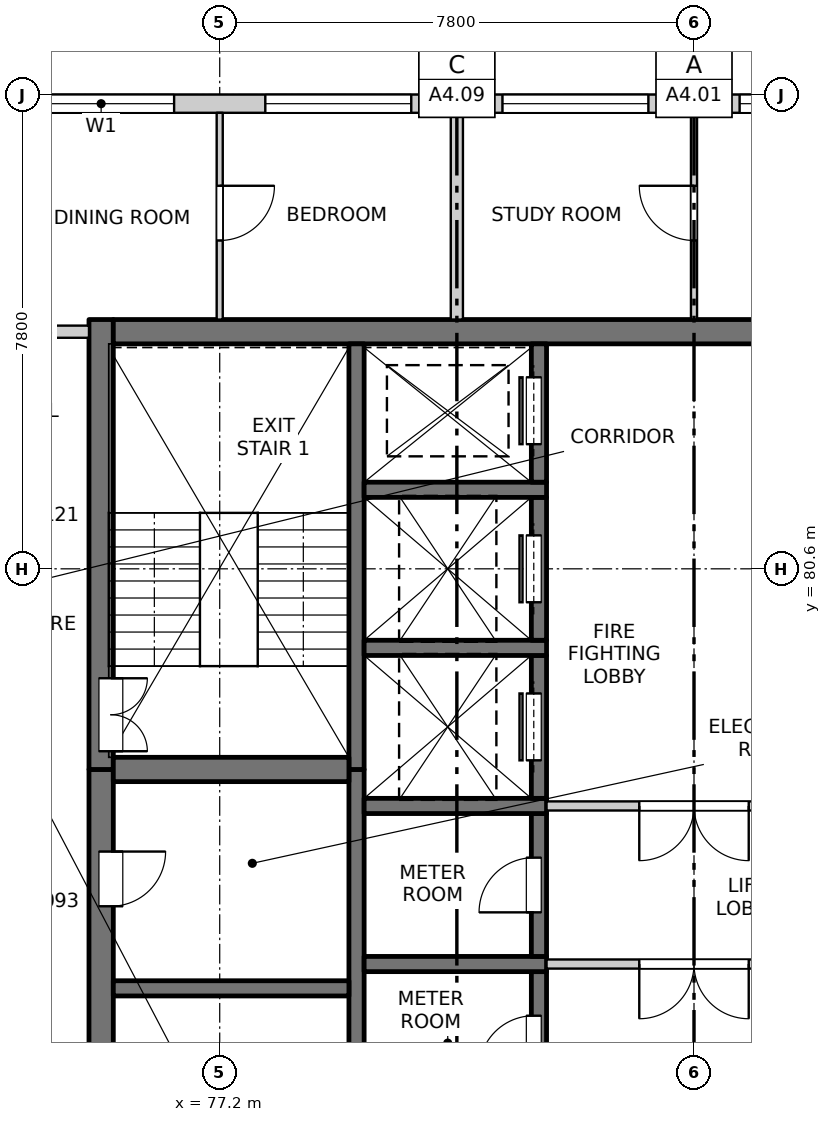
"""IFC4 building model, lengths in metres.
Left out: names, types, materials, properties, quantities, classifications, styles, units other than length and angle.
Written with IfcOpenShell. Run it as: python <this file> out.ifc"""

import sys

from ifc_helpers import new_model, si_unit, direction, frame, frame_2d, origin, place, context, subcontext, project, spatial, rectangle, extrude, element, fill, save


model = new_model("IFC4")
c1 = context("Model", 3, precision=1e-05, world=origin(), true_north=direction((0.0, 1.0)))
c2 = subcontext(c1, "Body", "Model", "MODEL_VIEW")
j1 = project(units=[si_unit("LENGTHUNIT", "METRE"), si_unit("PLANEANGLEUNIT", "RADIAN")], contexts=[c1])
p1 = place(None, origin())
s1 = spatial("IfcSite", under=j1, at=p1, CompositionType="ELEMENT")
p2 = place(p1, origin())
s2 = spatial("IfcBuilding", under=s1, at=p2, CompositionType="ELEMENT")
p3 = place(p2, frame((0.0, 0.0, 210.9)))
s3 = spatial("IfcBuildingStorey", under=s2, at=p3, CompositionType="ELEMENT", Elevation=210.9)
p4 = place(p3, frame((75.25, 55.05, -0.25), z_axis=(0.0, 0.0, 1.0), x_axis=(0.0, 1.0, 0.0)))
e1 = element("IfcWall", 1, at=p4, inside=s3, PredefinedType="SOLIDWALL", context=c2, shape_type="SweptSolid", body=[
    extrude(rectangle(XDim=22.25, YDim=0.4, at=frame_2d((11.125, 0.0))), origin(), (0.0, 0.0, 1.0), 3.4),
])
p5 = place(p4, frame((7.4, 0.0, 0.25)))
e2 = element("IfcOpeningElement", 2, at=p5, cuts=e1, PredefinedType="OPENING", context=c2, shape_type="SweptSolid", body=[
    extrude(rectangle(XDim=0.9, YDim=2.1, at=frame_2d((0.45, 1.05))), frame((0.0, 0.21, 0.0), z_axis=(0.0, -1.0, 0.0), x_axis=(1.0, 0.0, 0.0)), (0.0, 0.0, 1.0), 0.42),
])
p6 = place(p4, frame((13.7, 0.0, 0.25)))
e3 = element("IfcOpeningElement", 3, at=p6, cuts=e1, PredefinedType="OPENING", context=c2, shape_type="SweptSolid", body=[
    extrude(rectangle(XDim=0.9, YDim=2.1, at=frame_2d((0.45, 1.05))), frame((0.0, 0.21, 0.0), z_axis=(0.0, -1.0, 0.0), x_axis=(1.0, 0.0, 0.0)), (0.0, 0.0, 1.0), 0.42),
])
p7 = place(p4, frame((20.0, 0.0, 0.25)))
e4 = element("IfcOpeningElement", 4, at=p7, cuts=e1, PredefinedType="OPENING", context=c2, shape_type="SweptSolid", body=[
    extrude(rectangle(XDim=0.9, YDim=2.1, at=frame_2d((0.45, 1.05))), frame((0.0, 0.21, 0.0), z_axis=(0.0, -1.0, 0.0), x_axis=(1.0, 0.0, 0.0)), (0.0, 0.0, 1.0), 0.42),
])
p8 = place(p3, frame((75.25, 77.3, -0.25), z_axis=(0.0, 0.0, 1.0), x_axis=(0.0, 1.0, 0.0)))
e5 = element("IfcWall", 5, at=p8, inside=s3, PredefinedType="SOLIDWALL", context=c2, shape_type="SweptSolid", body=[
    extrude(rectangle(XDim=7.4, YDim=0.4, at=frame_2d((3.7, 0.0))), origin(), (0.0, 0.0, 1.0), 3.4),
])
p9 = place(p8, frame((0.3, 0.0, 0.25)))
e6 = element("IfcOpeningElement", 6, at=p9, cuts=e5, PredefinedType="OPENING", context=c2, shape_type="SweptSolid", body=[
    extrude(rectangle(XDim=1.2, YDim=2.1, at=frame_2d((0.6, 1.05))), frame((0.0, 0.21, 0.0), z_axis=(0.0, -1.0, 0.0), x_axis=(1.0, 0.0, 0.0)), (0.0, 0.0, 1.0), 0.42),
])
p10 = place(p3, frame((75.45, 84.5, -0.25), z_axis=(0.0, 0.0, 1.0), x_axis=(1.0, 0.0, 0.0)))
e7 = element("IfcWall", 7, at=p10, inside=s3, PredefinedType="SOLIDWALL", context=c2, shape_type="SweptSolid", body=[
    extrude(rectangle(XDim=19.1, YDim=0.4, at=frame_2d((9.55, 0.0))), origin(), (0.0, 0.0, 1.0), 3.4),
])
p11 = place(p3, frame((79.45, 60.975, -0.25), z_axis=(0.0, 0.0, 1.0), x_axis=(0.0, 1.0, 0.0)))
e8 = element("IfcWall", 8, at=p11, inside=s3, PredefinedType="SOLIDWALL", context=c2, shape_type="SweptSolid", body=[
    extrude(rectangle(XDim=16.325, YDim=0.25, at=frame_2d((8.163, 0.0))), origin(), (0.0, 0.0, 1.0), 3.4),
])
p12 = place(p3, frame((79.45, 77.3, -0.25), z_axis=(0.0, 0.0, 1.0), x_axis=(0.0, 1.0, 0.0)))
e9 = element("IfcWall", 9, at=p12, inside=s3, PredefinedType="SOLIDWALL", context=c2, shape_type="SweptSolid", body=[
    extrude(rectangle(XDim=7.0, YDim=0.25, at=frame_2d((3.5, 0.0))), origin(), (0.0, 0.0, 1.0), 3.4),
])
p13 = place(p3, frame((82.45, 71.625, -0.25), z_axis=(0.0, 0.0, 1.0), x_axis=(0.0, 1.0, 0.0)))
e10 = element("IfcWall", 10, at=p13, inside=s3, PredefinedType="SOLIDWALL", context=c2, shape_type="SweptSolid", body=[
    extrude(rectangle(XDim=2.35, YDim=0.25, at=frame_2d((1.175, 0.0))), origin(), (0.0, 0.0, 1.0), 3.4),
])
p14 = place(p13, frame((0.725, 0.0, 0.25)))
e11 = element("IfcOpeningElement", 11, at=p14, cuts=e10, PredefinedType="OPENING", context=c2, shape_type="SweptSolid", body=[
    extrude(rectangle(XDim=0.9, YDim=2.1, at=frame_2d((0.45, 1.05))), frame((0.0, 0.135, 0.0), z_axis=(0.0, -1.0, 0.0), x_axis=(1.0, 0.0, 0.0)), (0.0, 0.0, 1.0), 0.27),
])
p15 = place(p3, frame((79.575, 74.1, -0.25), z_axis=(0.0, 0.0, 1.0), x_axis=(1.0, 0.0, 0.0)))
e12 = element("IfcWall", 12, at=p15, inside=s3, PredefinedType="SOLIDWALL", context=c2, shape_type="SweptSolid", body=[
    extrude(rectangle(XDim=3.0, YDim=0.25, at=frame_2d((1.5, 0.0))), origin(), (0.0, 0.0, 1.0), 3.4),
])
p16 = place(p3, frame((82.45, 74.225, -0.25), z_axis=(0.0, 0.0, 1.0), x_axis=(0.0, 1.0, 0.0)))
e13 = element("IfcWall", 13, at=p16, inside=s3, PredefinedType="SOLIDWALL", context=c2, shape_type="SweptSolid", body=[
    extrude(rectangle(XDim=2.35, YDim=0.25, at=frame_2d((1.175, 0.0))), origin(), (0.0, 0.0, 1.0), 3.4),
])
p17 = place(p16, frame((0.725, 0.0, 0.25)))
e14 = element("IfcOpeningElement", 14, at=p17, cuts=e13, PredefinedType="OPENING", context=c2, shape_type="SweptSolid", body=[
    extrude(rectangle(XDim=0.9, YDim=2.1, at=frame_2d((0.45, 1.05))), frame((0.0, 0.135, 0.0), z_axis=(0.0, -1.0, 0.0), x_axis=(1.0, 0.0, 0.0)), (0.0, 0.0, 1.0), 0.27),
])
p18 = place(p3, frame((79.575, 76.7, -0.25), z_axis=(0.0, 0.0, 1.0), x_axis=(1.0, 0.0, 0.0)))
e15 = element("IfcWall", 15, at=p18, inside=s3, PredefinedType="SOLIDWALL", context=c2, shape_type="SweptSolid", body=[
    extrude(rectangle(XDim=3.0, YDim=0.25, at=frame_2d((1.5, 0.0))), origin(), (0.0, 0.0, 1.0), 3.4),
])
p19 = place(p3, frame((82.45, 76.825, -0.25), z_axis=(0.0, 0.0, 1.0), x_axis=(0.0, 1.0, 0.0)))
e16 = element("IfcWall", 16, at=p19, inside=s3, PredefinedType="SOLIDWALL", context=c2, shape_type="SweptSolid", body=[
    extrude(rectangle(XDim=2.35, YDim=0.25, at=frame_2d((1.175, 0.0))), origin(), (0.0, 0.0, 1.0), 3.4),
])
p20 = place(p19, frame((0.625, 0.0, 0.25)))
e17 = element("IfcOpeningElement", 17, at=p20, cuts=e16, PredefinedType="OPENING", context=c2, shape_type="SweptSolid", body=[
    extrude(rectangle(XDim=1.1, YDim=2.1, at=frame_2d((0.55, 1.05))), frame((0.0, 0.135, 0.0), z_axis=(0.0, -1.0, 0.0), x_axis=(1.0, 0.0, 0.0)), (0.0, 0.0, 1.0), 0.27),
])
p21 = place(p3, frame((79.575, 79.3, -0.25), z_axis=(0.0, 0.0, 1.0), x_axis=(1.0, 0.0, 0.0)))
e18 = element("IfcWall", 18, at=p21, inside=s3, PredefinedType="SOLIDWALL", context=c2, shape_type="SweptSolid", body=[
    extrude(rectangle(XDim=3.0, YDim=0.25, at=frame_2d((1.5, 0.0))), origin(), (0.0, 0.0, 1.0), 3.4),
])
p22 = place(p3, frame((82.45, 79.425, -0.25), z_axis=(0.0, 0.0, 1.0), x_axis=(0.0, 1.0, 0.0)))
e19 = element("IfcWall", 19, at=p22, inside=s3, PredefinedType="SOLIDWALL", context=c2, shape_type="SweptSolid", body=[
    extrude(rectangle(XDim=2.35, YDim=0.25, at=frame_2d((1.175, 0.0))), origin(), (0.0, 0.0, 1.0), 3.4),
])
p23 = place(p22, frame((0.625, 0.0, 0.25)))
e20 = element("IfcOpeningElement", 20, at=p23, cuts=e19, PredefinedType="OPENING", context=c2, shape_type="SweptSolid", body=[
    extrude(rectangle(XDim=1.1, YDim=2.1, at=frame_2d((0.55, 1.05))), frame((0.0, 0.135, 0.0), z_axis=(0.0, -1.0, 0.0), x_axis=(1.0, 0.0, 0.0)), (0.0, 0.0, 1.0), 0.27),
])
p24 = place(p3, frame((79.575, 81.9, -0.25), z_axis=(0.0, 0.0, 1.0), x_axis=(1.0, 0.0, 0.0)))
e21 = element("IfcWall", 21, at=p24, inside=s3, PredefinedType="SOLIDWALL", context=c2, shape_type="SweptSolid", body=[
    extrude(rectangle(XDim=3.0, YDim=0.25, at=frame_2d((1.5, 0.0))), origin(), (0.0, 0.0, 1.0), 3.4),
])
p25 = place(p3, frame((82.45, 82.025, -0.25), z_axis=(0.0, 0.0, 1.0), x_axis=(0.0, 1.0, 0.0)))
e22 = element("IfcWall", 22, at=p25, inside=s3, PredefinedType="SOLIDWALL", context=c2, shape_type="SweptSolid", body=[
    extrude(rectangle(XDim=2.275, YDim=0.25, at=frame_2d((1.138, 0.0))), origin(), (0.0, 0.0, 1.0), 3.4),
])
p26 = place(p25, frame((0.625, 0.0, 0.25)))
e23 = element("IfcOpeningElement", 23, at=p26, cuts=e22, PredefinedType="OPENING", context=c2, shape_type="SweptSolid", body=[
    extrude(rectangle(XDim=1.1, YDim=2.1, at=frame_2d((0.55, 1.05))), frame((0.0, 0.135, 0.0), z_axis=(0.0, -1.0, 0.0), x_axis=(1.0, 0.0, 0.0)), (0.0, 0.0, 1.0), 0.27),
])
p27 = place(p3, frame((75.45, 73.7, -0.25), z_axis=(0.0, 0.0, 1.0), x_axis=(1.0, 0.0, 0.0)))
e24 = element("IfcWall", 24, at=p27, inside=s3, PredefinedType="SOLIDWALL", context=c2, shape_type="SweptSolid", body=[
    extrude(rectangle(XDim=3.875, YDim=0.25, at=frame_2d((1.938, 0.0))), origin(), (0.0, 0.0, 1.0), 3.4),
])
p28 = place(p3, frame((75.45, 77.3, -0.25), z_axis=(0.0, 0.0, 1.0), x_axis=(1.0, 0.0, 0.0)))
e25 = element("IfcWall", 25, at=p28, inside=s3, PredefinedType="SOLIDWALL", context=c2, shape_type="SweptSolid", body=[
    extrude(rectangle(XDim=3.875, YDim=0.4, at=frame_2d((1.938, 0.0))), origin(), (0.0, 0.0, 1.0), 3.4),
])
p29 = place(p3, frame((73.7, 88.25, 0.0), z_axis=(0.0, 0.0, 1.0), x_axis=(1.0, 0.0, 0.0)))
e26 = element("IfcWall", 26, at=p29, inside=s3, PredefinedType="SOLIDWALL", context=c2, shape_type="SweptSolid", body=[
    extrude(rectangle(XDim=22.6, YDim=0.3, at=frame_2d((11.3, 0.0))), origin(), (0.0, 0.0, 1.0), 2.7),
])
p30 = place(p29, frame((0.35, 0.0, 0.9)))
e27 = element("IfcOpeningElement", 27, at=p30, cuts=e26, PredefinedType="OPENING", context=c2, shape_type="SweptSolid", body=[
    extrude(rectangle(XDim=2.4, YDim=1.8, at=frame_2d((1.2, 0.9))), frame((0.0, 0.16, 0.0), z_axis=(0.0, -1.0, 0.0), x_axis=(1.0, 0.0, 0.0)), (0.0, 0.0, 1.0), 0.32),
])
p31 = place(p29, frame((4.25, 0.0, 0.9)))
e28 = element("IfcOpeningElement", 28, at=p31, cuts=e26, PredefinedType="OPENING", context=c2, shape_type="SweptSolid", body=[
    extrude(rectangle(XDim=2.4, YDim=1.8, at=frame_2d((1.2, 0.9))), frame((0.0, 0.16, 0.0), z_axis=(0.0, -1.0, 0.0), x_axis=(1.0, 0.0, 0.0)), (0.0, 0.0, 1.0), 0.32),
])
p32 = place(p29, frame((8.15, 0.0, 0.9)))
e29 = element("IfcOpeningElement", 29, at=p32, cuts=e26, PredefinedType="OPENING", context=c2, shape_type="SweptSolid", body=[
    extrude(rectangle(XDim=2.4, YDim=1.8, at=frame_2d((1.2, 0.9))), frame((0.0, 0.16, 0.0), z_axis=(0.0, -1.0, 0.0), x_axis=(1.0, 0.0, 0.0)), (0.0, 0.0, 1.0), 0.32),
])
p33 = place(p29, frame((12.05, 0.0, 0.9)))
e30 = element("IfcOpeningElement", 30, at=p33, cuts=e26, PredefinedType="OPENING", context=c2, shape_type="SweptSolid", body=[
    extrude(rectangle(XDim=2.4, YDim=1.8, at=frame_2d((1.2, 0.9))), frame((0.0, 0.16, 0.0), z_axis=(0.0, -1.0, 0.0), x_axis=(1.0, 0.0, 0.0)), (0.0, 0.0, 1.0), 0.32),
])
p34 = place(p29, frame((15.95, 0.0, 0.9)))
e31 = element("IfcOpeningElement", 31, at=p34, cuts=e26, PredefinedType="OPENING", context=c2, shape_type="SweptSolid", body=[
    extrude(rectangle(XDim=2.4, YDim=1.8, at=frame_2d((1.2, 0.9))), frame((0.0, 0.16, 0.0), z_axis=(0.0, -1.0, 0.0), x_axis=(1.0, 0.0, 0.0)), (0.0, 0.0, 1.0), 0.32),
])
p35 = place(p29, frame((19.85, 0.0, 0.9)))
e32 = element("IfcOpeningElement", 32, at=p35, cuts=e26, PredefinedType="OPENING", context=c2, shape_type="SweptSolid", body=[
    extrude(rectangle(XDim=2.4, YDim=1.8, at=frame_2d((1.2, 0.9))), frame((0.0, 0.16, 0.0), z_axis=(0.0, -1.0, 0.0), x_axis=(1.0, 0.0, 0.0)), (0.0, 0.0, 1.0), 0.32),
])
p36 = place(p3, frame((82.575, 74.1, 0.0), z_axis=(0.0, 0.0, 1.0), x_axis=(1.0, 0.0, 0.0)))
e33 = element("IfcWall", 33, at=p36, inside=s3, PredefinedType="PARTITIONING", context=c2, shape_type="SweptSolid", body=[
    extrude(rectangle(XDim=4.85, YDim=0.15, at=frame_2d((2.425, 0.0))), origin(), (0.0, 0.0, 1.0), 3.15),
])
p37 = place(p36, frame((1.525, 0.0, 0.0)))
e34 = element("IfcOpeningElement", 34, at=p37, cuts=e33, PredefinedType="OPENING", context=c2, shape_type="SweptSolid", body=[
    extrude(rectangle(XDim=1.8, YDim=2.1, at=frame_2d((0.9, 1.05))), frame((0.0, 0.085, 0.0), z_axis=(0.0, -1.0, 0.0), x_axis=(1.0, 0.0, 0.0)), (0.0, 0.0, 1.0), 0.17),
])
p38 = place(p3, frame((82.575, 76.7, 0.0), z_axis=(0.0, 0.0, 1.0), x_axis=(1.0, 0.0, 0.0)))
e35 = element("IfcWall", 35, at=p38, inside=s3, PredefinedType="PARTITIONING", context=c2, shape_type="SweptSolid", body=[
    extrude(rectangle(XDim=4.85, YDim=0.15, at=frame_2d((2.425, 0.0))), origin(), (0.0, 0.0, 1.0), 3.15),
])
p39 = place(p38, frame((1.525, 0.0, 0.0)))
e36 = element("IfcOpeningElement", 36, at=p39, cuts=e35, PredefinedType="OPENING", context=c2, shape_type="SweptSolid", body=[
    extrude(rectangle(XDim=1.8, YDim=2.1, at=frame_2d((0.9, 1.05))), frame((0.0, 0.085, 0.0), z_axis=(0.0, -1.0, 0.0), x_axis=(1.0, 0.0, 0.0)), (0.0, 0.0, 1.0), 0.17),
])
p40 = place(p3, frame((73.2, 84.5, 0.0), z_axis=(0.0, 0.0, 1.0), x_axis=(1.0, 0.0, 0.0)))
e37 = element("IfcWall", 37, at=p40, inside=s3, PredefinedType="PARTITIONING", context=c2, shape_type="SweptSolid", body=[
    extrude(rectangle(XDim=1.85, YDim=0.2, at=frame_2d((0.925, 0.0))), origin(), (0.0, 0.0, 1.0), 3.15),
])
p41 = place(p3, frame((77.2, 84.7, 0.0), z_axis=(0.0, 0.0, 1.0), x_axis=(0.0, 1.0, 0.0)))
e38 = element("IfcWall", 38, at=p41, inside=s3, PredefinedType="PARTITIONING", context=c2, shape_type="SweptSolid", body=[
    extrude(rectangle(XDim=3.4, YDim=0.1, at=frame_2d((1.7, 0.0))), origin(), (0.0, 0.0, 1.0), 3.15),
])
p42 = place(p41, frame((1.3, 0.0, 0.0)))
e39 = element("IfcOpeningElement", 39, at=p42, cuts=e38, PredefinedType="OPENING", context=c2, shape_type="SweptSolid", body=[
    extrude(rectangle(XDim=0.9, YDim=2.1, at=frame_2d((0.45, 1.05))), frame((0.0, 0.06, 0.0), z_axis=(0.0, -1.0, 0.0), x_axis=(1.0, 0.0, 0.0)), (0.0, 0.0, 1.0), 0.12),
])
p43 = place(p3, frame((81.1, 84.7, 0.0), z_axis=(0.0, 0.0, 1.0), x_axis=(0.0, 1.0, 0.0)))
e40 = element("IfcWall", 40, at=p43, inside=s3, PredefinedType="PARTITIONING", context=c2, shape_type="SweptSolid", body=[
    extrude(rectangle(XDim=3.4, YDim=0.2, at=frame_2d((1.7, 0.0))), origin(), (0.0, 0.0, 1.0), 3.15),
])
p44 = place(p3, frame((85.0, 84.7, 0.0), z_axis=(0.0, 0.0, 1.0), x_axis=(0.0, 1.0, 0.0)))
e41 = element("IfcWall", 41, at=p44, inside=s3, PredefinedType="PARTITIONING", context=c2, shape_type="SweptSolid", body=[
    extrude(rectangle(XDim=3.4, YDim=0.1, at=frame_2d((1.7, 0.0))), origin(), (0.0, 0.0, 1.0), 3.15),
])
p45 = place(p44, frame((1.3, 0.0, 0.0)))
e42 = element("IfcOpeningElement", 42, at=p45, cuts=e41, PredefinedType="OPENING", context=c2, shape_type="SweptSolid", body=[
    extrude(rectangle(XDim=0.9, YDim=2.1, at=frame_2d((0.45, 1.05))), frame((0.0, 0.06, 0.0), z_axis=(0.0, -1.0, 0.0), x_axis=(1.0, 0.0, 0.0)), (0.0, 0.0, 1.0), 0.12),
])
p46 = place(p30, origin())
e43 = element("IfcWindow", 43, at=p46, inside=s3, PartitioningType="DOUBLE_PANEL_VERTICAL", PredefinedType="WINDOW", context=c2, shape_type="SweptSolid", body=[
    extrude(rectangle(XDim=2.4, YDim=1.8, at=frame_2d((1.2, 0.9))), frame((0.0, 0.03, 0.0), z_axis=(0.0, -1.0, 0.0), x_axis=(1.0, 0.0, 0.0)), (0.0, 0.0, 1.0), 0.06),
])
fill(e27, e43)
p47 = place(p31, origin())
e44 = element("IfcWindow", 44, at=p47, inside=s3, PartitioningType="DOUBLE_PANEL_VERTICAL", PredefinedType="WINDOW", context=c2, shape_type="SweptSolid", body=[
    extrude(rectangle(XDim=2.4, YDim=1.8, at=frame_2d((1.2, 0.9))), frame((0.0, 0.03, 0.0), z_axis=(0.0, -1.0, 0.0), x_axis=(1.0, 0.0, 0.0)), (0.0, 0.0, 1.0), 0.06),
])
fill(e28, e44)
p48 = place(p32, origin())
e45 = element("IfcWindow", 45, at=p48, inside=s3, PartitioningType="DOUBLE_PANEL_VERTICAL", PredefinedType="WINDOW", context=c2, shape_type="SweptSolid", body=[
    extrude(rectangle(XDim=2.4, YDim=1.8, at=frame_2d((1.2, 0.9))), frame((0.0, 0.03, 0.0), z_axis=(0.0, -1.0, 0.0), x_axis=(1.0, 0.0, 0.0)), (0.0, 0.0, 1.0), 0.06),
])
fill(e29, e45)
p49 = place(p33, origin())
e46 = element("IfcWindow", 46, at=p49, inside=s3, PartitioningType="DOUBLE_PANEL_VERTICAL", PredefinedType="WINDOW", context=c2, shape_type="SweptSolid", body=[
    extrude(rectangle(XDim=2.4, YDim=1.8, at=frame_2d((1.2, 0.9))), frame((0.0, 0.03, 0.0), z_axis=(0.0, -1.0, 0.0), x_axis=(1.0, 0.0, 0.0)), (0.0, 0.0, 1.0), 0.06),
])
fill(e30, e46)
p50 = place(p14, origin())
e47 = element("IfcDoor", 47, at=p50, inside=s3, OperationType="SINGLE_SWING_LEFT", PredefinedType="DOOR", context=c2, shape_type="SweptSolid", body=[
    extrude(rectangle(XDim=0.9, YDim=2.1, at=frame_2d((0.45, 1.05))), frame((0.0, 0.11, 0.0), z_axis=(0.0, -1.0, 0.0), x_axis=(1.0, 0.0, 0.0)), (0.0, 0.0, 1.0), 0.05),
])
fill(e11, e47)
p51 = place(p37, origin())
e48 = element("IfcDoor", 48, at=p51, inside=s3, OperationType="DOUBLE_DOOR_SINGLE_SWING", PredefinedType="DOOR", context=c2, shape_type="SweptSolid", body=[
    extrude(rectangle(XDim=1.8, YDim=2.1, at=frame_2d((0.9, 1.05))), frame((0.0, 0.025, 0.0), z_axis=(0.0, -1.0, 0.0), x_axis=(1.0, 0.0, 0.0)), (0.0, 0.0, 1.0), 0.05),
])
fill(e34, e48)
p52 = place(p17, origin())
e49 = element("IfcDoor", 49, at=p52, inside=s3, OperationType="SINGLE_SWING_LEFT", PredefinedType="DOOR", context=c2, shape_type="SweptSolid", body=[
    extrude(rectangle(XDim=0.9, YDim=2.1, at=frame_2d((0.45, 1.05))), frame((0.0, 0.11, 0.0), z_axis=(0.0, -1.0, 0.0), x_axis=(1.0, 0.0, 0.0)), (0.0, 0.0, 1.0), 0.05),
])
fill(e14, e49)
p53 = place(p7, origin())
e50 = element("IfcDoor", 50, at=p53, inside=s3, OperationType="SINGLE_SWING_LEFT", PredefinedType="DOOR", context=c2, shape_type="SweptSolid", body=[
    extrude(rectangle(XDim=0.9, YDim=2.1, at=frame_2d((0.45, 1.05))), frame((0.0, -0.135, 0.0), z_axis=(0.0, -1.0, 0.0), x_axis=(1.0, 0.0, 0.0)), (0.0, 0.0, 1.0), 0.05),
])
fill(e4, e50)
p54 = place(p39, origin())
e51 = element("IfcDoor", 51, at=p54, inside=s3, OperationType="DOUBLE_DOOR_SINGLE_SWING", PredefinedType="DOOR", context=c2, shape_type="SweptSolid", body=[
    extrude(rectangle(XDim=1.8, YDim=2.1, at=frame_2d((0.9, 1.05))), frame((0.0, 0.025, 0.0), z_axis=(0.0, -1.0, 0.0), x_axis=(1.0, 0.0, 0.0)), (0.0, 0.0, 1.0), 0.05),
])
fill(e36, e51)
p55 = place(p20, origin())
e52 = element("IfcDoor", 52, at=p55, inside=s3, OperationType="SLIDING_TO_LEFT", PredefinedType="DOOR", context=c2, shape_type="SweptSolid", body=[
    extrude(rectangle(XDim=1.1, YDim=2.1, at=frame_2d((0.55, 1.05))), frame((0.0, 0.11, 0.0), z_axis=(0.0, -1.0, 0.0), x_axis=(1.0, 0.0, 0.0)), (0.0, 0.0, 1.0), 0.05),
])
fill(e17, e52)
p56 = place(p9, origin())
e53 = element("IfcDoor", 53, at=p56, inside=s3, OperationType="DOUBLE_DOOR_SINGLE_SWING", PredefinedType="DOOR", context=c2, shape_type="SweptSolid", body=[
    extrude(rectangle(XDim=1.2, YDim=2.1, at=frame_2d((0.6, 1.05))), frame((0.0, -0.135, 0.0), z_axis=(0.0, -1.0, 0.0), x_axis=(1.0, 0.0, 0.0)), (0.0, 0.0, 1.0), 0.05),
])
fill(e6, e53)
p57 = place(p23, origin())
e54 = element("IfcDoor", 54, at=p57, inside=s3, OperationType="SLIDING_TO_LEFT", PredefinedType="DOOR", context=c2, shape_type="SweptSolid", body=[
    extrude(rectangle(XDim=1.1, YDim=2.1, at=frame_2d((0.55, 1.05))), frame((0.0, 0.11, 0.0), z_axis=(0.0, -1.0, 0.0), x_axis=(1.0, 0.0, 0.0)), (0.0, 0.0, 1.0), 0.05),
])
fill(e20, e54)
p58 = place(p26, origin())
e55 = element("IfcDoor", 55, at=p58, inside=s3, OperationType="SLIDING_TO_RIGHT", PredefinedType="DOOR", context=c2, shape_type="SweptSolid", body=[
    extrude(rectangle(XDim=1.1, YDim=2.1, at=frame_2d((0.55, 1.05))), frame((0.0, 0.11, 0.0), z_axis=(0.0, -1.0, 0.0), x_axis=(1.0, 0.0, 0.0)), (0.0, 0.0, 1.0), 0.05),
])
fill(e23, e55)
p59 = place(p42, origin())
e56 = element("IfcDoor", 56, at=p59, inside=s3, OperationType="SINGLE_SWING_LEFT", PredefinedType="DOOR", context=c2, shape_type="SweptSolid", body=[
    extrude(rectangle(XDim=0.9, YDim=2.1, at=frame_2d((0.45, 1.05))), frame((0.0, 0.025, 0.0), z_axis=(0.0, -1.0, 0.0), x_axis=(1.0, 0.0, 0.0)), (0.0, 0.0, 1.0), 0.05),
])
fill(e39, e56)
p60 = place(p45, origin())
e57 = element("IfcDoor", 57, at=p60, inside=s3, OperationType="SINGLE_SWING_RIGHT", PredefinedType="DOOR", context=c2, shape_type="SweptSolid", body=[
    extrude(rectangle(XDim=0.9, YDim=2.1, at=frame_2d((0.45, 1.05))), frame((0.0, 0.025, 0.0), z_axis=(0.0, -1.0, 0.0), x_axis=(1.0, 0.0, 0.0)), (0.0, 0.0, 1.0), 0.05),
])
fill(e42, e57)
save(model, sys.argv[1])
